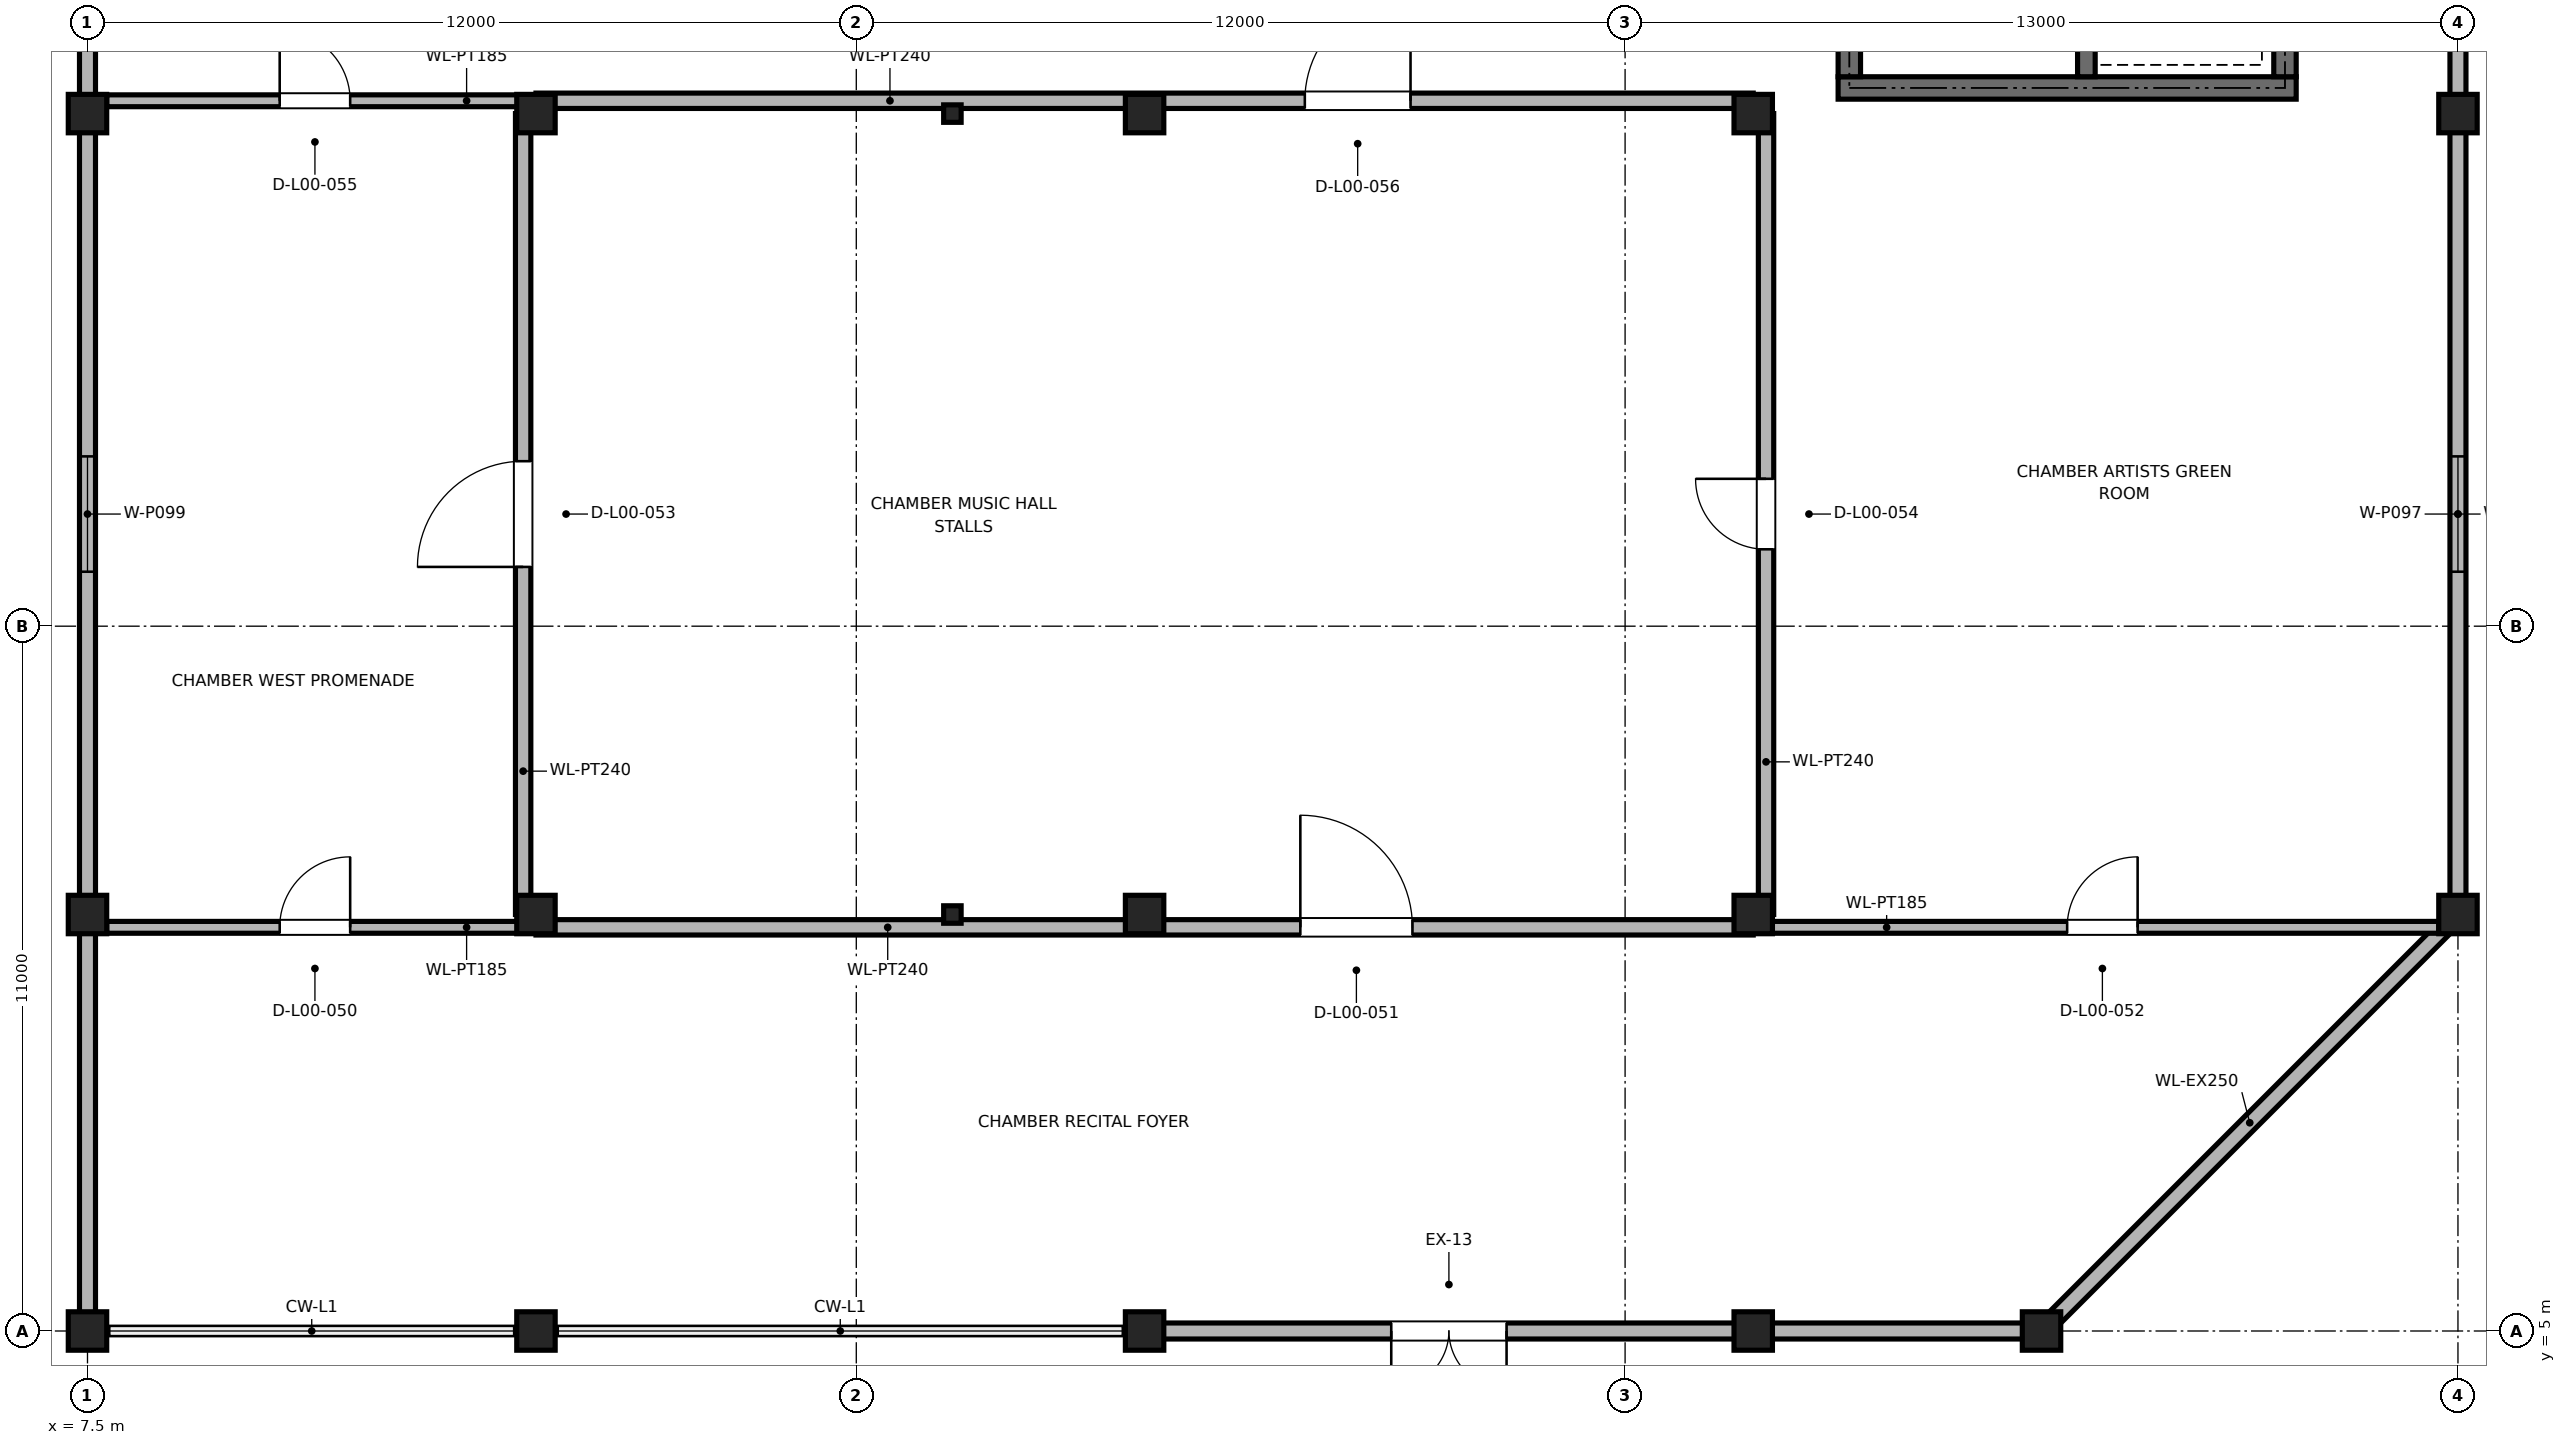
"""IFC4 building model, lengths in metres.
Left out: names, types, materials, properties, quantities, classifications, styles, units other than length and angle.
Written with IfcOpenShell. Run it as: python <this file> out.ifc"""

import sys

from ifc_helpers import new_model, si_unit, direction, frame, frame_2d, origin, origin_2d, place, context, subcontext, project, spatial, rectangle, hollow_circle, extrude, element, fill, save


model = new_model("IFC4")
c1 = context("Model", 3, precision=1e-05, world=origin(), true_north=direction((0.0, 1.0)))
c2 = subcontext(c1, "Body", "Model", "MODEL_VIEW")
j1 = project(units=[si_unit("LENGTHUNIT", "METRE"), si_unit("PLANEANGLEUNIT", "RADIAN")], contexts=[c1])
p1 = place(None, origin())
s1 = spatial("IfcSite", under=j1, at=p1, CompositionType="ELEMENT")
p2 = place(p1, origin())
s2 = spatial("IfcBuilding", under=s1, at=p2, CompositionType="ELEMENT")
p3 = place(p2, origin())
s3 = spatial("IfcBuildingStorey", under=s2, at=p3, CompositionType="ELEMENT", Elevation=0.0)
for number, where, z_axis, x_axis in (
    (1, (7.5, 5.0, 0.0), (0.0, 0.0, 1.0), (1.0, 0.0, 0.0)),
    (2, (14.5, 5.0, 0.0), (0.0, 0.0, 1.0), (1.0, 0.0, 0.0)),
    (3, (24.0, 5.0, 0.0), (0.0, 0.0, 1.0), (1.0, 0.0, 0.0)),
    (4, (33.5, 5.0, 0.0), (0.0, 0.0, 1.0), (1.0, 0.0, 0.0)),
    (5, (38.0, 5.0, 0.0), (0.0, 0.0, 1.0), (1.0, 0.0, 0.0)),
    (6, (44.5, 11.5, 0.0), (0.0, 0.0, 1.0), (1.0, 0.0, 0.0)),
    (7, (44.5, 24.0, 0.0), (0.0, 0.0, 1.0), (1.0, 0.0, 0.0)),
    (8, (7.5, 24.0, 0.0), (0.0, 0.0, 1.0), (1.0, 0.0, 0.0)),
    (9, (7.5, 11.5, 0.0), (0.0, 0.0, 1.0), (1.0, 0.0, 0.0)),
    (10, (14.5, 11.5, 0.0), (0.0, 0.0, 1.0), (1.0, 0.0, 0.0)),
    (11, (24.0, 11.5, 0.0), (0.0, 0.0, 1.0), (1.0, 0.0, 0.0)),
    (12, (33.5, 11.5, 0.0), (0.0, 0.0, 1.0), (1.0, 0.0, 0.0)),
    (13, (14.5, 24.0, 0.0), (0.0, 0.0, 1.0), (1.0, 0.0, 0.0)),
    (14, (24.0, 24.0, 0.0), (0.0, 0.0, 1.0), (1.0, 0.0, 0.0)),
    (15, (33.5, 24.0, 0.0), (0.0, 0.0, 1.0), (1.0, 0.0, 0.0)),
):
    element("IfcColumn", number, at=place(p3, frame(where, z_axis=z_axis, x_axis=x_axis)), inside=s3, PredefinedType="COLUMN", context=c2, shape_type="SweptSolid", body=[
        extrude(rectangle(XDim=0.6, YDim=0.6, at=origin_2d()), origin(), (0.0, 0.0, 1.0), 4.8),
    ])
for number, where, z_axis, x_axis in (
    (16, (21.0, 11.5, 0.0), (0.0, 0.0, 1.0), (1.0, 0.0, 0.0)),
    (17, (21.0, 24.0, 0.0), (0.0, 0.0, 1.0), (1.0, 0.0, 0.0)),
):
    element("IfcColumn", number, at=place(p3, frame(where, z_axis=z_axis, x_axis=x_axis)), inside=s3, PredefinedType="COLUMN", context=c2, shape_type="SweptSolid", body=[
        extrude(hollow_circle(Radius=0.136, WallThickness=0.016, at=origin_2d()), origin(), (0.0, 0.0, 1.0), 4.8),
    ])
p4 = place(p3, frame((33.48, 5.0, 0.0), z_axis=(0.0, 0.0, 1.0), x_axis=(-1.0, 0.0, 0.0)))
e18 = element("IfcWall", 18, at=p4, inside=s3, PredefinedType="SOLIDWALL", context=c2, shape_type="SweptSolid", body=[
    extrude(rectangle(XDim=9.46, YDim=0.25, at=frame_2d((4.73, 0.0))), origin(), (0.0, 0.0, 1.0), 4.008),
])
p5 = place(p4, frame((3.83, 0.0, 0.0)))
e19 = element("IfcOpeningElement", 19, at=p5, cuts=e18, PredefinedType="OPENING", context=c2, shape_type="SweptSolid", body=[
    extrude(rectangle(XDim=1.8, YDim=2.25, at=frame_2d((0.9, 1.125))), frame((0.0, 0.135, 0.0), z_axis=(0.0, -1.0, 0.0), x_axis=(1.0, 0.0, 0.0)), (0.0, 0.0, 1.0), 0.27),
])
p6 = place(p3, frame((37.98, 5.0, 0.0), z_axis=(0.0, 0.0, 1.0), x_axis=(-1.0, 0.0, 0.0)))
e20 = element("IfcWall", 20, at=p6, inside=s3, PredefinedType="SOLIDWALL", context=c2, shape_type="SweptSolid", body=[
    extrude(rectangle(XDim=4.46, YDim=0.25, at=frame_2d((2.23, 0.0))), origin(), (0.0, 0.0, 1.0), 4.008),
])
p7 = place(p3, frame((44.486, 11.486, 0.0), z_axis=(0.0, 0.0, 1.0), x_axis=(-0.707106781187, -0.707106781187, 0.0)))
e21 = element("IfcWall", 21, at=p7, inside=s3, PredefinedType="SOLIDWALL", context=c2, shape_type="SweptSolid", body=[
    extrude(rectangle(XDim=9.152, YDim=0.25, at=frame_2d((4.576, 0.0))), origin(), (0.0, 0.0, 1.0), 4.008),
])
p8 = place(p3, frame((44.5, 23.98, 0.0), z_axis=(0.0, 0.0, 1.0), x_axis=(0.0, -1.0, 0.0)))
e22 = element("IfcWall", 22, at=p8, inside=s3, PredefinedType="SOLIDWALL", context=c2, shape_type="SweptSolid", body=[
    extrude(rectangle(XDim=12.46, YDim=0.25, at=frame_2d((6.23, 0.0))), origin(), (0.0, 0.0, 1.0), 4.008),
])
p9 = place(p8, frame((5.33, 0.0, 0.85)))
e23 = element("IfcOpeningElement", 23, at=p9, cuts=e22, PredefinedType="OPENING", context=c2, shape_type="SweptSolid", body=[
    extrude(rectangle(XDim=1.8, YDim=1.7, at=frame_2d((0.9, 0.85))), frame((0.0, 0.135, 0.0), z_axis=(0.0, -1.0, 0.0), x_axis=(1.0, 0.0, 0.0)), (0.0, 0.0, 1.0), 0.27),
])
p10 = place(p3, frame((44.5, 29.98, 0.0), z_axis=(0.0, 0.0, 1.0), x_axis=(0.0, -1.0, 0.0)))
e24 = element("IfcWall", 24, at=p10, inside=s3, PredefinedType="SOLIDWALL", context=c2, shape_type="SweptSolid", body=[
    extrude(rectangle(XDim=5.96, YDim=0.25, at=frame_2d((2.98, 0.0))), origin(), (0.0, 0.0, 1.0), 4.058),
])
p11 = place(p3, frame((7.5, 24.02, 0.0), z_axis=(0.0, 0.0, 1.0), x_axis=(0.0, 1.0, 0.0)))
e25 = element("IfcWall", 25, at=p11, inside=s3, PredefinedType="SOLIDWALL", context=c2, shape_type="SweptSolid", body=[
    extrude(rectangle(XDim=13.96, YDim=0.25, at=frame_2d((6.98, 0.0))), origin(), (0.0, 0.0, 1.0), 4.058),
])
p12 = place(p3, frame((7.5, 11.52, 0.0), z_axis=(0.0, 0.0, 1.0), x_axis=(0.0, 1.0, 0.0)))
e26 = element("IfcWall", 26, at=p12, inside=s3, PredefinedType="SOLIDWALL", context=c2, shape_type="SweptSolid", body=[
    extrude(rectangle(XDim=12.46, YDim=0.25, at=frame_2d((6.23, 0.0))), origin(), (0.0, 0.0, 1.0), 4.058),
])
p13 = place(p12, frame((5.33, 0.0, 0.85)))
e27 = element("IfcOpeningElement", 27, at=p13, cuts=e26, PredefinedType="OPENING", context=c2, shape_type="SweptSolid", body=[
    extrude(rectangle(XDim=1.8, YDim=1.7, at=frame_2d((0.9, 0.85))), frame((0.0, 0.135, 0.0), z_axis=(0.0, -1.0, 0.0), x_axis=(1.0, 0.0, 0.0)), (0.0, 0.0, 1.0), 0.27),
])
p14 = place(p3, frame((7.5, 5.02, 0.0), z_axis=(0.0, 0.0, 1.0), x_axis=(0.0, 1.0, 0.0)))
e28 = element("IfcWall", 28, at=p14, inside=s3, PredefinedType="SOLIDWALL", context=c2, shape_type="SweptSolid", body=[
    extrude(rectangle(XDim=6.46, YDim=0.25, at=frame_2d((3.23, 0.0))), origin(), (0.0, 0.0, 1.0), 4.058),
])
p15 = place(p3, frame((34.825, 24.4, 0.0), z_axis=(0.0, 0.0, 1.0), x_axis=(1.0, 0.0, 0.0)))
e29 = element("IfcWall", 29, at=p15, inside=s3, PredefinedType="SHEAR", context=c2, shape_type="SweptSolid", body=[
    extrude(rectangle(XDim=7.15, YDim=0.35, at=frame_2d((3.575, 0.0))), origin(), (0.0, 0.0, 1.0), 4.52),
])
for number, where, z_axis, x_axis in (
    (30, (35.0, 24.575, 0.0), (0.0, 0.0, 1.0), (0.0, 1.0, 0.0)),
    (31, (41.8, 24.575, 0.0), (0.0, 0.0, 1.0), (0.0, 1.0, 0.0)),
):
    element("IfcWall", number, at=place(p3, frame(where, z_axis=z_axis, x_axis=x_axis)), inside=s3, PredefinedType="SHEAR", context=c2, shape_type="SweptSolid", body=[
        extrude(rectangle(XDim=11.2, YDim=0.35, at=frame_2d((5.6, 0.0))), origin(), (0.0, 0.0, 1.0), 4.52),
    ])
p16 = place(p3, frame((38.7, 24.575, 0.0), z_axis=(0.0, 0.0, 1.0), x_axis=(0.0, 1.0, 0.0)))
e32 = element("IfcWall", 32, at=p16, inside=s3, PredefinedType="SHEAR", context=c2, shape_type="SweptSolid", body=[
    extrude(rectangle(XDim=6.637, YDim=0.275, at=frame_2d((3.319, 0.0))), origin(), (0.0, 0.0, 1.0), 4.52),
])
p17 = place(p3, frame((7.8, 11.3, 0.0), z_axis=(0.0, 0.0, 1.0), x_axis=(1.0, 0.0, 0.0)))
e33 = element("IfcWall", 33, at=p17, inside=s3, PredefinedType="PARTITIONING", context=c2, shape_type="SweptSolid", body=[
    extrude(rectangle(XDim=6.5, YDim=0.185, at=frame_2d((3.25, 0.0))), origin(), (0.0, 0.0, 1.0), 4.06),
])
p18 = place(p17, frame((2.7, 0.0, 0.0)))
e34 = element("IfcOpeningElement", 34, at=p18, cuts=e33, PredefinedType="OPENING", context=c2, shape_type="SweptSolid", body=[
    extrude(rectangle(XDim=1.1, YDim=2.15, at=frame_2d((0.55, 1.075))), frame((0.0, 0.103, 0.0), z_axis=(0.0, -1.0, 0.0), x_axis=(1.0, 0.0, 0.0)), (0.0, 0.0, 1.0), 0.205),
])
p19 = place(p3, frame((14.5, 11.3, 0.0), z_axis=(0.0, 0.0, 1.0), x_axis=(1.0, 0.0, 0.0)))
e35 = element("IfcWall", 35, at=p19, inside=s3, PredefinedType="PARTITIONING", context=c2, shape_type="SweptSolid", body=[
    extrude(rectangle(XDim=19.0, YDim=0.24, at=frame_2d((9.5, 0.0))), origin(), (0.0, 0.0, 1.0), 4.06),
])
p20 = place(p19, frame((11.931, 0.0, 0.0)))
e36 = element("IfcOpeningElement", 36, at=p20, cuts=e35, PredefinedType="OPENING", context=c2, shape_type="SweptSolid", body=[
    extrude(rectangle(XDim=1.75, YDim=2.25, at=frame_2d((0.875, 1.125))), frame((0.0, 0.13, 0.0), z_axis=(0.0, -1.0, 0.0), x_axis=(1.0, 0.0, 0.0)), (0.0, 0.0, 1.0), 0.26),
])
p21 = place(p3, frame((33.7, 11.3, 0.0), z_axis=(0.0, 0.0, 1.0), x_axis=(1.0, 0.0, 0.0)))
e37 = element("IfcWall", 37, at=p21, inside=s3, PredefinedType="PARTITIONING", context=c2, shape_type="SweptSolid", body=[
    extrude(rectangle(XDim=10.5, YDim=0.185, at=frame_2d((5.25, 0.0))), origin(), (0.0, 0.0, 1.0), 4.01),
])
p22 = place(p21, frame((4.7, 0.0, 0.0)))
e38 = element("IfcOpeningElement", 38, at=p22, cuts=e37, PredefinedType="OPENING", context=c2, shape_type="SweptSolid", body=[
    extrude(rectangle(XDim=1.1, YDim=2.15, at=frame_2d((0.55, 1.075))), frame((0.0, 0.103, 0.0), z_axis=(0.0, -1.0, 0.0), x_axis=(1.0, 0.0, 0.0)), (0.0, 0.0, 1.0), 0.205),
])
p23 = place(p3, frame((14.3, 11.5, 0.0), z_axis=(0.0, 0.0, 1.0), x_axis=(0.0, 1.0, 0.0)))
e39 = element("IfcWall", 39, at=p23, inside=s3, PredefinedType="PARTITIONING", context=c2, shape_type="SweptSolid", body=[
    extrude(rectangle(XDim=12.5, YDim=0.24, at=frame_2d((6.25, 0.0))), origin(), (0.0, 0.0, 1.0), 4.06),
])
p24 = place(p23, frame((5.425, 0.0, 0.0)))
e40 = element("IfcOpeningElement", 40, at=p24, cuts=e39, PredefinedType="OPENING", context=c2, shape_type="SweptSolid", body=[
    extrude(rectangle(XDim=1.65, YDim=2.2, at=frame_2d((0.825, 1.1))), frame((0.0, 0.13, 0.0), z_axis=(0.0, -1.0, 0.0), x_axis=(1.0, 0.0, 0.0)), (0.0, 0.0, 1.0), 0.26),
])
p25 = place(p3, frame((33.7, 11.5, 0.0), z_axis=(0.0, 0.0, 1.0), x_axis=(0.0, 1.0, 0.0)))
e41 = element("IfcWall", 41, at=p25, inside=s3, PredefinedType="PARTITIONING", context=c2, shape_type="SweptSolid", body=[
    extrude(rectangle(XDim=12.5, YDim=0.24, at=frame_2d((6.25, 0.0))), origin(), (0.0, 0.0, 1.0), 4.06),
])
p26 = place(p25, frame((5.7, 0.0, 0.0)))
e42 = element("IfcOpeningElement", 42, at=p26, cuts=e41, PredefinedType="OPENING", context=c2, shape_type="SweptSolid", body=[
    extrude(rectangle(XDim=1.1, YDim=2.15, at=frame_2d((0.55, 1.075))), frame((0.0, 0.13, 0.0), z_axis=(0.0, -1.0, 0.0), x_axis=(1.0, 0.0, 0.0)), (0.0, 0.0, 1.0), 0.26),
])
p27 = place(p3, frame((7.8, 24.2, 0.0), z_axis=(0.0, 0.0, 1.0), x_axis=(1.0, 0.0, 0.0)))
e43 = element("IfcWall", 43, at=p27, inside=s3, PredefinedType="PARTITIONING", context=c2, shape_type="SweptSolid", body=[
    extrude(rectangle(XDim=6.5, YDim=0.185, at=frame_2d((3.25, 0.0))), origin(), (0.0, 0.0, 1.0), 4.06),
])
p28 = place(p27, frame((2.7, 0.0, 0.0)))
e44 = element("IfcOpeningElement", 44, at=p28, cuts=e43, PredefinedType="OPENING", context=c2, shape_type="SweptSolid", body=[
    extrude(rectangle(XDim=1.1, YDim=2.15, at=frame_2d((0.55, 1.075))), frame((0.0, 0.103, 0.0), z_axis=(0.0, -1.0, 0.0), x_axis=(1.0, 0.0, 0.0)), (0.0, 0.0, 1.0), 0.205),
])
p29 = place(p3, frame((14.5, 24.2, 0.0), z_axis=(0.0, 0.0, 1.0), x_axis=(1.0, 0.0, 0.0)))
e45 = element("IfcWall", 45, at=p29, inside=s3, PredefinedType="PARTITIONING", context=c2, shape_type="SweptSolid", body=[
    extrude(rectangle(XDim=19.0, YDim=0.24, at=frame_2d((9.5, 0.0))), origin(), (0.0, 0.0, 1.0), 4.06),
])
p30 = place(p29, frame((12.001, 0.0, 0.0)))
e46 = element("IfcOpeningElement", 46, at=p30, cuts=e45, PredefinedType="OPENING", context=c2, shape_type="SweptSolid", body=[
    extrude(rectangle(XDim=1.65, YDim=2.2, at=frame_2d((0.825, 1.1))), frame((0.0, 0.13, 0.0), z_axis=(0.0, -1.0, 0.0), x_axis=(1.0, 0.0, 0.0)), (0.0, 0.0, 1.0), 0.26),
])
p31 = place(p5, origin())
e47 = element("IfcDoor", 47, at=p31, inside=s3, OperationType="DOUBLE_DOOR_SINGLE_SWING", PredefinedType="DOOR", context=c2, shape_type="SweptSolid", body=[
    extrude(rectangle(XDim=1.8, YDim=2.25, at=frame_2d((0.9, 1.125))), frame((0.0, 0.025, 0.0), z_axis=(0.0, -1.0, 0.0), x_axis=(1.0, 0.0, 0.0)), (0.0, 0.0, 1.0), 0.05),
])
fill(e19, e47)
p32 = place(p9, origin())
e48 = element("IfcWindow", 48, at=p32, inside=s3, PartitioningType="SINGLE_PANEL", PredefinedType="WINDOW", context=c2, shape_type="SweptSolid", body=[
    extrude(rectangle(XDim=1.8, YDim=1.7, at=frame_2d((0.9, 0.85))), frame((0.0, 0.03, 0.0), z_axis=(0.0, -1.0, 0.0), x_axis=(1.0, 0.0, 0.0)), (0.0, 0.0, 1.0), 0.06),
])
fill(e23, e48)
p33 = place(p13, origin())
e49 = element("IfcWindow", 49, at=p33, inside=s3, PartitioningType="SINGLE_PANEL", PredefinedType="WINDOW", context=c2, shape_type="SweptSolid", body=[
    extrude(rectangle(XDim=1.8, YDim=1.7, at=frame_2d((0.9, 0.85))), frame((0.0, 0.03, 0.0), z_axis=(0.0, -1.0, 0.0), x_axis=(1.0, 0.0, 0.0)), (0.0, 0.0, 1.0), 0.06),
])
fill(e27, e49)
p34 = place(p18, origin())
e50 = element("IfcDoor", 50, at=p34, inside=s3, OperationType="SINGLE_SWING_RIGHT", PredefinedType="DOOR", context=c2, shape_type="SweptSolid", body=[
    extrude(rectangle(XDim=1.1, YDim=2.15, at=frame_2d((0.55, 1.075))), frame((0.0, 0.025, 0.0), z_axis=(0.0, -1.0, 0.0), x_axis=(1.0, 0.0, 0.0)), (0.0, 0.0, 1.0), 0.05),
])
fill(e34, e50)
p35 = place(p20, origin())
e51 = element("IfcDoor", 51, at=p35, inside=s3, OperationType="SINGLE_SWING_LEFT", PredefinedType="DOOR", context=c2, shape_type="SweptSolid", body=[
    extrude(rectangle(XDim=1.75, YDim=2.25, at=frame_2d((0.875, 1.125))), frame((0.0, 0.025, 0.0), z_axis=(0.0, -1.0, 0.0), x_axis=(1.0, 0.0, 0.0)), (0.0, 0.0, 1.0), 0.05),
])
fill(e36, e51)
p36 = place(p22, origin())
e52 = element("IfcDoor", 52, at=p36, inside=s3, OperationType="SINGLE_SWING_RIGHT", PredefinedType="DOOR", context=c2, shape_type="SweptSolid", body=[
    extrude(rectangle(XDim=1.1, YDim=2.15, at=frame_2d((0.55, 1.075))), frame((0.0, 0.025, 0.0), z_axis=(0.0, -1.0, 0.0), x_axis=(1.0, 0.0, 0.0)), (0.0, 0.0, 1.0), 0.05),
])
fill(e38, e52)
p37 = place(p24, origin())
e53 = element("IfcDoor", 53, at=p37, inside=s3, OperationType="SINGLE_SWING_LEFT", PredefinedType="DOOR", context=c2, shape_type="SweptSolid", body=[
    extrude(rectangle(XDim=1.65, YDim=2.2, at=frame_2d((0.825, 1.1))), frame((0.0, 0.025, 0.0), z_axis=(0.0, -1.0, 0.0), x_axis=(1.0, 0.0, 0.0)), (0.0, 0.0, 1.0), 0.05),
])
fill(e40, e53)
p38 = place(p26, origin())
e54 = element("IfcDoor", 54, at=p38, inside=s3, OperationType="SINGLE_SWING_RIGHT", PredefinedType="DOOR", context=c2, shape_type="SweptSolid", body=[
    extrude(rectangle(XDim=1.1, YDim=2.15, at=frame_2d((0.55, 1.075))), frame((0.0, 0.025, 0.0), z_axis=(0.0, -1.0, 0.0), x_axis=(1.0, 0.0, 0.0)), (0.0, 0.0, 1.0), 0.05),
])
fill(e42, e54)
p39 = place(p28, origin())
e55 = element("IfcDoor", 55, at=p39, inside=s3, OperationType="SINGLE_SWING_LEFT", PredefinedType="DOOR", context=c2, shape_type="SweptSolid", body=[
    extrude(rectangle(XDim=1.1, YDim=2.15, at=frame_2d((0.55, 1.075))), frame((0.0, 0.025, 0.0), z_axis=(0.0, -1.0, 0.0), x_axis=(1.0, 0.0, 0.0)), (0.0, 0.0, 1.0), 0.05),
])
fill(e44, e55)
p40 = place(p30, origin())
e56 = element("IfcDoor", 56, at=p40, inside=s3, OperationType="SINGLE_SWING_RIGHT", PredefinedType="DOOR", context=c2, shape_type="SweptSolid", body=[
    extrude(rectangle(XDim=1.65, YDim=2.2, at=frame_2d((0.825, 1.1))), frame((0.0, 0.025, 0.0), z_axis=(0.0, -1.0, 0.0), x_axis=(1.0, 0.0, 0.0)), (0.0, 0.0, 1.0), 0.05),
])
fill(e46, e56)
save(model, sys.argv[1])
